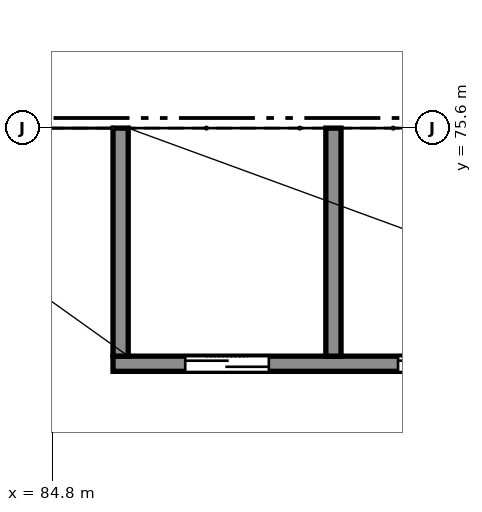
"""IFC4 building model, lengths in metres.
Left out: names, types, materials, properties, quantities, classifications, styles, units other than length and angle.
Written with IfcOpenShell. Run it as: python <this file> out.ifc"""

import sys

from ifc_helpers import new_model, si_unit, direction, frame, frame_2d, origin, place, context, subcontext, project, spatial, rectangle, extrude, element, fill, save


model = new_model("IFC4")
c1 = context("Model", 3, precision=1e-05, world=origin(), true_north=direction((0.0, 1.0)))
c2 = subcontext(c1, "Body", "Model", "MODEL_VIEW")
j1 = project(units=[si_unit("LENGTHUNIT", "METRE"), si_unit("PLANEANGLEUNIT", "RADIAN")], contexts=[c1])
p1 = place(None, origin())
s1 = spatial("IfcSite", under=j1, at=p1, CompositionType="ELEMENT")
p2 = place(p1, origin())
s2 = spatial("IfcBuilding", under=s1, at=p2, CompositionType="ELEMENT")
p3 = place(p2, frame((0.0, 0.0, 20.0)))
s3 = spatial("IfcBuildingStorey", under=s2, at=p3, CompositionType="ELEMENT", Elevation=20.0)
p4 = place(p3, frame((85.6, 72.5, 0.0), z_axis=(0.0, 0.0, 1.0), x_axis=(1.0, 0.0, 0.0)))
e1 = element("IfcWall", 1, at=p4, inside=s3, PredefinedType="SHEAR", context=c2, shape_type="SweptSolid", body=[
    extrude(rectangle(XDim=8.6, YDim=0.2, at=frame_2d((4.3, 0.0))), origin(), (0.0, 0.0, 1.0), 5.0),
])
p5 = place(p4, frame((0.95, 0.0, 0.0)))
e2 = element("IfcOpeningElement", 2, at=p5, cuts=e1, PredefinedType="OPENING", context=c2, shape_type="SweptSolid", body=[
    extrude(rectangle(XDim=1.1, YDim=2.1, at=frame_2d((0.55, 1.05))), frame((0.0, 0.11, 0.0), z_axis=(0.0, -1.0, 0.0), x_axis=(1.0, 0.0, 0.0)), (0.0, 0.0, 1.0), 0.22),
])
p6 = place(p4, frame((3.75, 0.0, 0.0)))
e3 = element("IfcOpeningElement", 3, at=p6, cuts=e1, PredefinedType="OPENING", context=c2, shape_type="SweptSolid", body=[
    extrude(rectangle(XDim=1.1, YDim=2.1, at=frame_2d((0.55, 1.05))), frame((0.0, 0.11, 0.0), z_axis=(0.0, -1.0, 0.0), x_axis=(1.0, 0.0, 0.0)), (0.0, 0.0, 1.0), 0.22),
])
p7 = place(p4, frame((6.55, 0.0, 0.0)))
e4 = element("IfcOpeningElement", 4, at=p7, cuts=e1, PredefinedType="OPENING", context=c2, shape_type="SweptSolid", body=[
    extrude(rectangle(XDim=1.1, YDim=2.1, at=frame_2d((0.55, 1.05))), frame((0.0, 0.11, 0.0), z_axis=(0.0, -1.0, 0.0), x_axis=(1.0, 0.0, 0.0)), (0.0, 0.0, 1.0), 0.22),
])
for number, where, z_axis, x_axis in (
    (5, (85.7, 72.6, 0.0), (0.0, 0.0, 1.0), (0.0, 1.0, 0.0)),
    (6, (88.5, 72.6, 0.0), (0.0, 0.0, 1.0), (0.0, 1.0, 0.0)),
):
    element("IfcWall", number, at=place(p3, frame(where, z_axis=z_axis, x_axis=x_axis)), inside=s3, PredefinedType="SHEAR", context=c2, shape_type="SweptSolid", body=[
        extrude(rectangle(XDim=3.0, YDim=0.2, at=frame_2d((1.5, 0.0))), origin(), (0.0, 0.0, 1.0), 5.0),
    ])
p8 = place(p5, origin())
e7 = element("IfcDoor", 7, at=p8, inside=s3, OperationType="DOUBLE_DOOR_SLIDING", PredefinedType="DOOR", context=c2, shape_type="SweptSolid", body=[
    extrude(rectangle(XDim=1.1, YDim=2.1, at=frame_2d((0.55, 1.05))), frame((0.0, 0.025, 0.0), z_axis=(0.0, -1.0, 0.0), x_axis=(1.0, 0.0, 0.0)), (0.0, 0.0, 1.0), 0.05),
])
fill(e2, e7)
p9 = place(p6, origin())
e8 = element("IfcDoor", 8, at=p9, inside=s3, OperationType="DOUBLE_DOOR_SLIDING", PredefinedType="DOOR", context=c2, shape_type="SweptSolid", body=[
    extrude(rectangle(XDim=1.1, YDim=2.1, at=frame_2d((0.55, 1.05))), frame((0.0, 0.025, 0.0), z_axis=(0.0, -1.0, 0.0), x_axis=(1.0, 0.0, 0.0)), (0.0, 0.0, 1.0), 0.05),
])
fill(e3, e8)
save(model, sys.argv[1])
